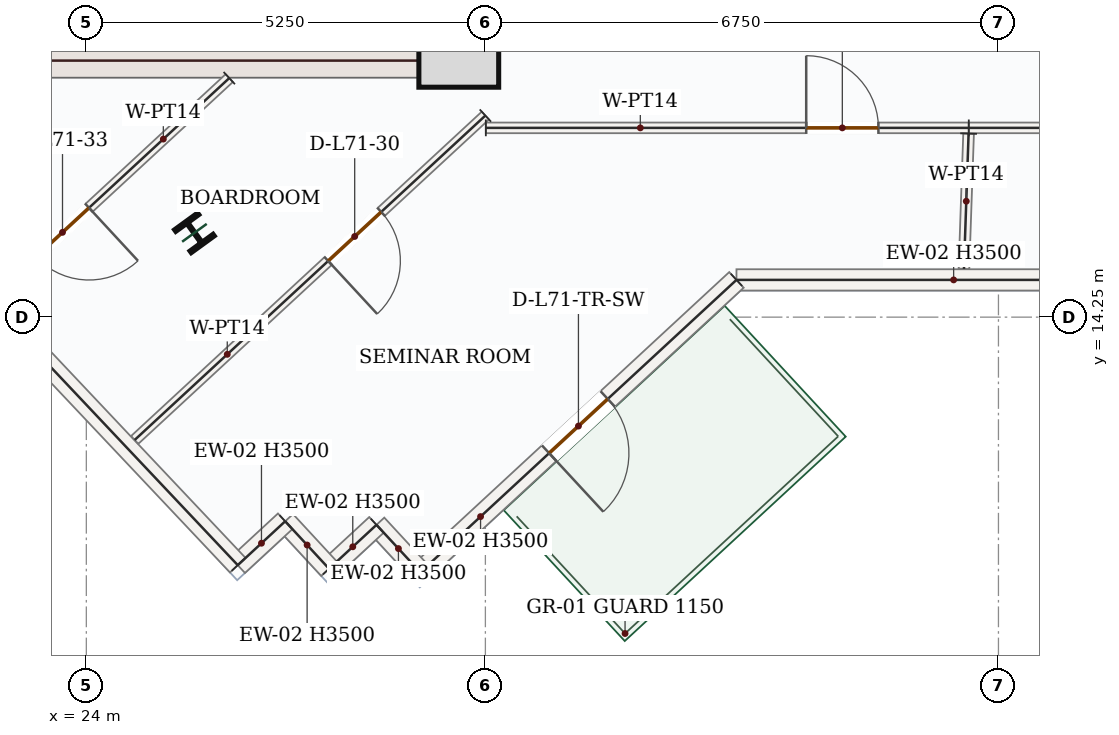
"""IFC4 building model, lengths in metres.
Left out: names, types, materials, properties, quantities, classifications, styles, units other than length and angle.
Written with IfcOpenShell. Run it as: python <this file> out.ifc"""

import sys

from ifc_helpers import new_model, si_unit, direction, frame, frame_2d, origin, origin_2d, place, context, subcontext, project, spatial, rectangle, i_section, extrude, source, transform, mapped, element, fill, save


model = new_model("IFC4")
c1 = context("Model", 3, precision=1e-05, world=origin(), true_north=direction((0.0, 1.0)))
c2 = subcontext(c1, "Body", "Model", "MODEL_VIEW")
j1 = project(units=[si_unit("LENGTHUNIT", "METRE"), si_unit("PLANEANGLEUNIT", "RADIAN")], contexts=[c1])
p1 = place(None, origin())
s1 = spatial("IfcSite", under=j1, at=p1, CompositionType="ELEMENT")
p2 = place(p1, origin())
s2 = spatial("IfcBuilding", under=s1, at=p2, CompositionType="ELEMENT")
p3 = place(p2, frame((0.0, 0.0, 295.35)))
s3 = spatial("IfcBuildingStorey", under=s2, at=p3, CompositionType="ELEMENT", Elevation=295.35)
p4 = place(p3, frame((29.025, 17.4, 0.0), z_axis=(0.0, 0.0, 1.0), x_axis=(0.0, 1.0, 0.0)))
e1 = element("IfcWall", 1, at=p4, inside=s3, PredefinedType="SHEAR", context=c2, shape_type="SweptSolid", body=[
    extrude(rectangle(XDim=8.55, YDim=0.45, at=frame_2d((4.275, 0.0))), origin(), (0.0, 0.0, 1.0), 3.5),
])
p5 = place(p4, frame((6.65, 0.0, 0.0)))
e2 = element("IfcOpeningElement", 2, at=p5, cuts=e1, PredefinedType="OPENING", context=c2, shape_type="SweptSolid", body=[
    extrude(rectangle(XDim=1.1, YDim=2.2, at=frame_2d((0.55, 1.1))), frame((0.0, 0.235, 0.0), z_axis=(0.0, -1.0, 0.0), x_axis=(1.0, 0.0, 0.0)), (0.0, 0.0, 1.0), 0.47),
])
p6 = place(p4, frame((2.15, 0.0, 0.0)))
e3 = element("IfcOpeningElement", 3, at=p6, cuts=e1, PredefinedType="OPENING", context=c2, shape_type="SweptSolid", body=[
    extrude(rectangle(XDim=0.88, YDim=2.1, at=frame_2d((0.44, 1.05))), frame((0.0, 0.235, 0.0), z_axis=(0.0, -1.0, 0.0), x_axis=(1.0, 0.0, 0.0)), (0.0, 0.0, 1.0), 0.47),
])
p7 = place(p4, frame((4.25, 0.0, 0.0)))
e4 = element("IfcOpeningElement", 4, at=p7, cuts=e1, PredefinedType="OPENING", context=c2, shape_type="SweptSolid", body=[
    extrude(rectangle(XDim=0.88, YDim=2.1, at=frame_2d((0.44, 1.05))), frame((0.0, 0.235, 0.0), z_axis=(0.0, -1.0, 0.0), x_axis=(1.0, 0.0, 0.0)), (0.0, 0.0, 1.0), 0.47),
])
m1 = source(origin(), c2, "Body", "SweptSolid", [
    extrude(rectangle(XDim=7.1, YDim=0.45, at=frame_2d((3.55, 0.0))), origin(), (0.0, 0.0, 1.0), 3.5),
])
p8 = place(p3, frame((21.7, 17.625, 0.0), z_axis=(0.0, 0.0, 1.0), x_axis=(1.0, 0.0, 0.0)))
e5 = element("IfcWall", 5, at=p8, inside=s3, PredefinedType="SHEAR", context=c2, shape_type="MappedRepresentation", body=[
    mapped(m1, transform((0.0, 0.0, 0.0), x_axis=(1.0, 0.0, 0.0), y_axis=(0.0, 1.0, 0.0), z_axis=(0.0, 0.0, 1.0), scale=1.0)),
])
m2 = source(origin(), c2, "Body", "SweptSolid", [
    extrude(rectangle(XDim=1.05, YDim=1.05, at=origin_2d()), origin(), (0.0, 0.0, 1.0), 3.75),
])
p9 = place(p3, frame((28.9, 17.8, 0.0), z_axis=(0.0, 0.0, 1.0), x_axis=(1.0, 0.0, 0.0)))
e6 = element("IfcColumn", 6, at=p9, inside=s3, PredefinedType="COLUMN", context=c2, shape_type="MappedRepresentation", body=[
    mapped(m2, transform((0.0, 0.0, 0.0), x_axis=(1.0, 0.0, 0.0), y_axis=(0.0, 1.0, 0.0), z_axis=(0.0, 0.0, 1.0), scale=1.0)),
])
m3 = source(origin(), c2, "Body", "SweptSolid", [
    extrude(i_section(OverallWidth=0.374, OverallDepth=0.372, WebThickness=0.016, FlangeThickness=0.026, FilletRadius=0.018, at=origin_2d()), origin(), (0.0, 0.0, 1.0), 3.75),
])
p10 = place(p3, frame((25.422, 15.359, 0.0), z_axis=(0.0, 0.0, 1.0), x_axis=(0.809016994375, 0.587785252292, 0.0)))
e7 = element("IfcColumn", 7, at=p10, inside=s3, PredefinedType="COLUMN", context=c2, shape_type="MappedRepresentation", body=[
    mapped(m3, transform((0.0, 0.0, 0.0), x_axis=(1.0, 0.0, 0.0), y_axis=(0.0, 1.0, 0.0), z_axis=(0.0, 0.0, 1.0), scale=1.0)),
])
m4 = source(origin(), c2, "Body", "SweptSolid", [
    extrude(rectangle(XDim=5.714, YDim=0.28, at=frame_2d((2.857, 0.0))), origin(), (0.0, 0.0, 1.0), 3.5),
])
p11 = place(p3, frame((38.268, 14.74, 0.0), z_axis=(0.0, 0.0, 1.0), x_axis=(-1.0, 0.0, 0.0)))
e8 = element("IfcWall", 8, at=p11, inside=s3, PredefinedType="SOLIDWALL", context=c2, shape_type="MappedRepresentation", body=[
    mapped(m4, transform((0.0, 0.0, 0.0), x_axis=(1.0, 0.0, 0.0), y_axis=(0.0, 1.0, 0.0), z_axis=(0.0, 0.0, 1.0), scale=1.0)),
])
p12 = place(p3, frame((32.553, 14.74, 0.0), z_axis=(0.0, 0.0, 1.0), x_axis=(-0.734109106874, -0.679031530346, 0.0)))
e9 = element("IfcWall", 9, at=p12, inside=s3, PredefinedType="SOLIDWALL", context=c2, shape_type="SweptSolid", body=[
    extrude(rectangle(XDim=5.665, YDim=0.28, at=frame_2d((2.833, 0.0))), origin(), (0.0, 0.0, 1.0), 3.5),
])
p13 = place(p12, frame((2.307, 0.0, 0.0)))
e10 = element("IfcOpeningElement", 10, at=p13, cuts=e9, PredefinedType="OPENING", context=c2, shape_type="SweptSolid", body=[
    extrude(rectangle(XDim=1.05, YDim=2.15, at=frame_2d((0.525, 1.075))), frame((0.0, 0.15, 0.0), z_axis=(0.0, -1.0, 0.0), x_axis=(1.0, 0.0, 0.0)), (0.0, 0.0, 1.0), 0.3),
])
m5 = source(origin(), c2, "Body", "SweptSolid", [
    extrude(rectangle(XDim=0.85, YDim=0.28, at=frame_2d((0.425, 0.0))), origin(), (0.0, 0.0, 1.0), 3.5),
])
for number, where, z_axis, x_axis in (
    (11, (28.395, 10.893, 0.0), (0.0, 0.0, 1.0), (-0.679, 0.734, 0.0)),
    (12, (27.817, 11.517, 0.0), (0.0, 0.0, 1.0), (-0.734, -0.679, 0.0)),
    (13, (27.193, 10.94, 0.0), (0.0, 0.0, 1.0), (-0.679, 0.734, 0.0)),
    (14, (26.616, 11.564, 0.0), (0.0, 0.0, 1.0), (-0.734, -0.679, 0.0)),
):
    element("IfcWall", number, at=place(p3, frame(where, z_axis=z_axis, x_axis=x_axis)), inside=s3, PredefinedType="SOLIDWALL", context=c2, shape_type="MappedRepresentation", body=[
        mapped(m5, transform((0.0, 0.0, 0.0), x_axis=(1.0, 0.0, 0.0), y_axis=(0.0, 1.0, 0.0), z_axis=(0.0, 0.0, 1.0), scale=1.0)),
    ])
m6 = source(origin(), c2, "Body", "SweptSolid", [
    extrude(rectangle(XDim=10.274, YDim=0.28, at=frame_2d((5.137, 0.0))), origin(), (0.0, 0.0, 1.0), 3.5),
])
p14 = place(p3, frame((25.992, 10.987, 0.0), z_axis=(0.0, 0.0, 1.0), x_axis=(-0.68643580465, 0.727190405667, 0.0)))
e15 = element("IfcWall", 15, at=p14, inside=s3, PredefinedType="SOLIDWALL", context=c2, shape_type="MappedRepresentation", body=[
    mapped(m6, transform((0.0, 0.0, 0.0), x_axis=(1.0, 0.0, 0.0), y_axis=(0.0, 1.0, 0.0), z_axis=(0.0, 0.0, 1.0), scale=1.0)),
])
p15 = place(p3, frame((25.881, 17.395, 0.0), z_axis=(0.0, 0.0, 1.0), x_axis=(-0.734127876216, -0.679011238024, 0.0)))
e16 = element("IfcWall", 16, at=p15, inside=s3, PredefinedType="PARTITIONING", context=c2, shape_type="SweptSolid", body=[
    extrude(rectangle(XDim=4.173, YDim=0.14, at=frame_2d((2.086, 0.0))), origin(), (0.0, 0.0, 1.0), 3.5),
])
p16 = place(p15, frame((2.514, 0.0, 0.0)))
e17 = element("IfcOpeningElement", 17, at=p16, cuts=e16, PredefinedType="OPENING", context=c2, shape_type="SweptSolid", body=[
    extrude(rectangle(XDim=0.95, YDim=2.15, at=frame_2d((0.475, 1.075))), frame((0.0, 0.08, 0.0), z_axis=(0.0, -1.0, 0.0), x_axis=(1.0, 0.0, 0.0)), (0.0, 0.0, 1.0), 0.16),
])
p17 = place(p3, frame((29.25, 16.902, 0.0), z_axis=(0.0, 0.0, 1.0), x_axis=(-0.734113479195, -0.679026803347, 0.0)))
e18 = element("IfcWall", 18, at=p17, inside=s3, PredefinedType="PARTITIONING", context=c2, shape_type="SweptSolid", body=[
    extrude(rectangle(XDim=6.284, YDim=0.14, at=frame_2d((3.142, 0.0))), origin(), (0.0, 0.0, 1.0), 3.5),
])
p18 = place(p17, frame((1.867, 0.0, 0.0)))
e19 = element("IfcOpeningElement", 19, at=p18, cuts=e18, PredefinedType="OPENING", context=c2, shape_type="SweptSolid", body=[
    extrude(rectangle(XDim=0.95, YDim=2.15, at=frame_2d((0.475, 1.075))), frame((0.0, 0.08, 0.0), z_axis=(0.0, -1.0, 0.0), x_axis=(1.0, 0.0, 0.0)), (0.0, 0.0, 1.0), 0.16),
])
p19 = place(p3, frame((29.256, 16.74, 0.0), z_axis=(0.0, 0.0, 1.0), x_axis=(1.0, 0.0, 0.0)))
e20 = element("IfcWall", 20, at=p19, inside=s3, PredefinedType="PARTITIONING", context=c2, shape_type="SweptSolid", body=[
    extrude(rectangle(XDim=6.354, YDim=0.14, at=frame_2d((3.177, 0.0))), origin(), (0.0, 0.0, 1.0), 3.5),
])
p20 = place(p19, frame((4.215, 0.0, 0.0)))
e21 = element("IfcOpeningElement", 21, at=p20, cuts=e20, PredefinedType="OPENING", context=c2, shape_type="SweptSolid", body=[
    extrude(rectangle(XDim=0.95, YDim=2.15, at=frame_2d((0.475, 1.075))), frame((0.0, 0.08, 0.0), z_axis=(0.0, -1.0, 0.0), x_axis=(1.0, 0.0, 0.0)), (0.0, 0.0, 1.0), 0.16),
])
m7 = source(origin(), c2, "Body", "SweptSolid", [
    extrude(rectangle(XDim=1.781, YDim=0.14, at=frame_2d((0.891, 0.0))), origin(), (0.0, 0.0, 1.0), 3.5),
])
p21 = place(p3, frame((35.607, 16.665, 0.0), z_axis=(0.0, 0.0, 1.0), x_axis=(-0.034268709891, -0.999412655274, 0.0)))
e22 = element("IfcWall", 22, at=p21, inside=s3, PredefinedType="PARTITIONING", context=c2, shape_type="MappedRepresentation", body=[
    mapped(m7, transform((0.0, 0.0, 0.0), x_axis=(1.0, 0.0, 0.0), y_axis=(0.0, 1.0, 0.0), z_axis=(0.0, 0.0, 1.0), scale=1.0)),
])
p22 = place(p3, frame((35.61, 16.74, 0.0), z_axis=(0.0, 0.0, 1.0), x_axis=(1.0, 0.0, 0.0)))
e23 = element("IfcWall", 23, at=p22, inside=s3, PredefinedType="PARTITIONING", context=c2, shape_type="SweptSolid", body=[
    extrude(rectangle(XDim=6.515, YDim=0.14, at=frame_2d((3.258, 0.0))), origin(), (0.0, 0.0, 1.0), 3.5),
])
p23 = place(p22, frame((1.224, 0.0, 0.0)))
e24 = element("IfcOpeningElement", 24, at=p23, cuts=e23, PredefinedType="OPENING", context=c2, shape_type="SweptSolid", body=[
    extrude(rectangle(XDim=0.95, YDim=2.15, at=frame_2d((0.475, 1.075))), frame((0.0, 0.08, 0.0), z_axis=(0.0, -1.0, 0.0), x_axis=(1.0, 0.0, 0.0)), (0.0, 0.0, 1.0), 0.16),
])
m8 = source(origin(), c2, "Body", "SweptSolid", [
    extrude(rectangle(XDim=1.05, YDim=2.15, at=frame_2d((0.525, 1.075))), frame((0.0, 0.025, 0.0), z_axis=(0.0, -1.0, 0.0), x_axis=(1.0, 0.0, 0.0)), (0.0, 0.0, 1.0), 0.05),
])
p24 = place(p13, origin())
e25 = element("IfcDoor", 25, at=p24, inside=s3, OperationType="SINGLE_SWING_RIGHT", PredefinedType="DOOR", context=c2, shape_type="MappedRepresentation", body=[
    mapped(m8, transform((0.0, 0.0, 0.0), x_axis=(1.0, 0.0, 0.0), y_axis=(0.0, 1.0, 0.0), z_axis=(0.0, 0.0, 1.0), scale=1.0)),
])
fill(e10, e25)
m9 = source(origin(), c2, "Body", "SweptSolid", [
    extrude(rectangle(XDim=0.95, YDim=2.15, at=frame_2d((0.475, 1.075))), frame((0.0, 0.025, 0.0), z_axis=(0.0, -1.0, 0.0), x_axis=(1.0, 0.0, 0.0)), (0.0, 0.0, 1.0), 0.05),
])
p25 = place(p20, origin())
e26 = element("IfcDoor", 26, at=p25, inside=s3, OperationType="SINGLE_SWING_LEFT", PredefinedType="DOOR", context=c2, shape_type="MappedRepresentation", body=[
    mapped(m9, transform((0.0, 0.0, 0.0), x_axis=(1.0, 0.0, 0.0), y_axis=(0.0, 1.0, 0.0), z_axis=(0.0, 0.0, 1.0), scale=1.0)),
])
fill(e21, e26)
p26 = place(p18, origin())
e27 = element("IfcDoor", 27, at=p26, inside=s3, OperationType="SINGLE_SWING_RIGHT", PredefinedType="DOOR", context=c2, shape_type="MappedRepresentation", body=[
    mapped(m9, transform((0.0, 0.0, 0.0), x_axis=(1.0, 0.0, 0.0), y_axis=(0.0, 1.0, 0.0), z_axis=(0.0, 0.0, 1.0), scale=1.0)),
])
fill(e19, e27)
p27 = place(p16, origin())
e28 = element("IfcDoor", 28, at=p27, inside=s3, OperationType="SINGLE_SWING_LEFT", PredefinedType="DOOR", context=c2, shape_type="MappedRepresentation", body=[
    mapped(m9, transform((0.0, 0.0, 0.0), x_axis=(1.0, 0.0, 0.0), y_axis=(0.0, 1.0, 0.0), z_axis=(0.0, 0.0, 1.0), scale=1.0)),
])
fill(e17, e28)
save(model, sys.argv[1])
